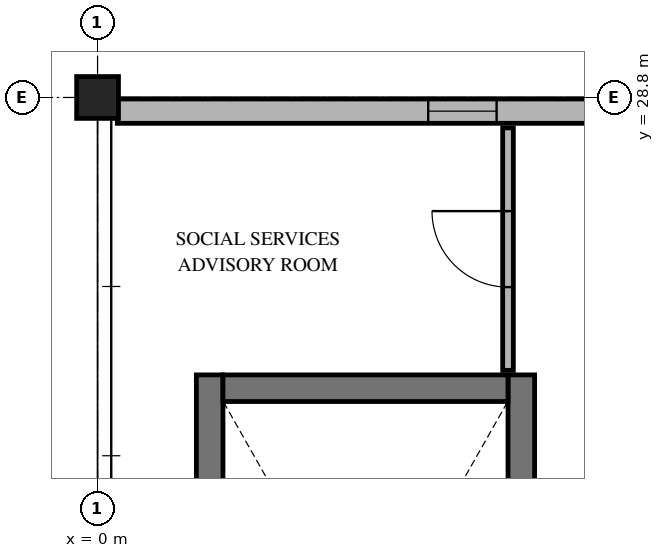
"""IFC4 building model, lengths in metres.
Left out: names, types, materials, properties, quantities, classifications, styles, units other than length and angle.
Written with IfcOpenShell. Run it as: python <this file> out.ifc"""

import sys

from ifc_helpers import new_model, si_unit, direction, frame, frame_2d, origin, origin_2d, place, context, subcontext, project, spatial, rectangle, extrude, element, fill, save


model = new_model("IFC4")
c1 = context("Model", 3, precision=1e-05, world=origin(), true_north=direction((0.0, 1.0)))
c2 = subcontext(c1, "Body", "Model", "MODEL_VIEW")
j1 = project(units=[si_unit("LENGTHUNIT", "METRE"), si_unit("PLANEANGLEUNIT", "RADIAN")], contexts=[c1])
p1 = place(None, origin())
s1 = spatial("IfcSite", under=j1, at=p1, CompositionType="ELEMENT")
p2 = place(p1, origin())
s2 = spatial("IfcBuilding", under=s1, at=p2, CompositionType="ELEMENT")
p3 = place(p2, frame((0.0, 0.0, 12.9)))
s3 = spatial("IfcBuildingStorey", under=s2, at=p3, CompositionType="ELEMENT", Elevation=12.9)
p4 = place(p3, frame((0.0, 28.8, 0.0), z_axis=(0.0, 0.0, 1.0), x_axis=(1.0, 0.0, 0.0)))
e1 = element("IfcColumn", 1, at=p4, inside=s3, PredefinedType="COLUMN", context=c2, shape_type="SweptSolid", body=[
    extrude(rectangle(XDim=0.55, YDim=0.55, at=origin_2d()), origin(), (0.0, 0.0, 1.0), 3.9),
])
p5 = place(p3, frame((0.26, 28.62, 0.0), z_axis=(0.0, 0.0, 1.0), x_axis=(1.0, 0.0, 0.0)))
e2 = element("IfcWall", 2, at=p5, inside=s3, PredefinedType="SOLIDWALL", context=c2, shape_type="SweptSolid", body=[
    extrude(rectangle(XDim=9.08, YDim=0.32, at=frame_2d((4.54, 0.0))), origin(), (0.0, 0.0, 1.0), 2.9),
])
p6 = place(p5, frame((4.09, 0.0, 0.9)))
e3 = element("IfcOpeningElement", 3, at=p6, cuts=e2, PredefinedType="OPENING", context=c2, shape_type="SweptSolid", body=[
    extrude(rectangle(XDim=0.9, YDim=1.2, at=frame_2d((0.45, 0.6))), frame((0.0, 0.17, 0.0), z_axis=(0.0, -1.0, 0.0), x_axis=(1.0, 0.0, 0.0)), (0.0, 0.0, 1.0), 0.34),
])
for number, where, z_axis, x_axis in (
    (4, (5.575, 16.05, 0.0), (0.0, 0.0, 1.0), (0.0, 1.0, 0.0)),
    (5, (1.475, 25.15, 0.0), (0.0, 0.0, 1.0), (0.0, -1.0, 0.0)),
):
    element("IfcWall", number, at=place(p3, frame(where, z_axis=z_axis, x_axis=x_axis)), inside=s3, PredefinedType="SHEAR", context=c2, shape_type="SweptSolid", body=[
        extrude(rectangle(XDim=9.1, YDim=0.35, at=frame_2d((4.55, 0.0))), origin(), (0.0, 0.0, 1.0), 3.66),
    ])
p7 = place(p3, frame((5.4, 24.975, 0.0), z_axis=(0.0, 0.0, 1.0), x_axis=(-1.0, 0.0, 0.0)))
e6 = element("IfcWall", 6, at=p7, inside=s3, PredefinedType="SHEAR", context=c2, shape_type="SweptSolid", body=[
    extrude(rectangle(XDim=3.75, YDim=0.35, at=frame_2d((1.875, 0.0))), origin(), (0.0, 0.0, 1.0), 3.66),
])
p8 = place(p3, frame((5.4, 25.21, 0.0), z_axis=(0.0, 0.0, 1.0), x_axis=(0.0, 1.0, 0.0)))
e7 = element("IfcWall", 7, at=p8, inside=s3, PredefinedType="PARTITIONING", context=c2, shape_type="SweptSolid", body=[
    extrude(rectangle(XDim=3.19, YDim=0.14, at=frame_2d((1.595, 0.0))), origin(), (0.0, 0.0, 1.0), 3.66),
])
p9 = place(p8, frame((1.095, 0.0, 0.0)))
e8 = element("IfcOpeningElement", 8, at=p9, cuts=e7, PredefinedType="OPENING", context=c2, shape_type="SweptSolid", body=[
    extrude(rectangle(XDim=1.0, YDim=2.15, at=frame_2d((0.5, 1.075))), frame((0.0, 0.08, 0.0), z_axis=(0.0, -1.0, 0.0), x_axis=(1.0, 0.0, 0.0)), (0.0, 0.0, 1.0), 0.16),
])
p10 = place(p6, origin())
e9 = element("IfcWindow", 9, at=p10, inside=s3, PartitioningType="SINGLE_PANEL", PredefinedType="WINDOW", context=c2, shape_type="SweptSolid", body=[
    extrude(rectangle(XDim=0.9, YDim=1.2, at=frame_2d((0.45, 0.6))), frame((0.0, 0.03, 0.0), z_axis=(0.0, -1.0, 0.0), x_axis=(1.0, 0.0, 0.0)), (0.0, 0.0, 1.0), 0.06),
])
fill(e3, e9)
p11 = place(p9, origin())
e10 = element("IfcDoor", 10, at=p11, inside=s3, OperationType="SINGLE_SWING_RIGHT", PredefinedType="DOOR", context=c2, shape_type="SweptSolid", body=[
    extrude(rectangle(XDim=1.0, YDim=2.15, at=frame_2d((0.5, 1.075))), frame((0.0, 0.025, 0.0), z_axis=(0.0, -1.0, 0.0), x_axis=(1.0, 0.0, 0.0)), (0.0, 0.0, 1.0), 0.05),
])
fill(e8, e10)
save(model, sys.argv[1])
